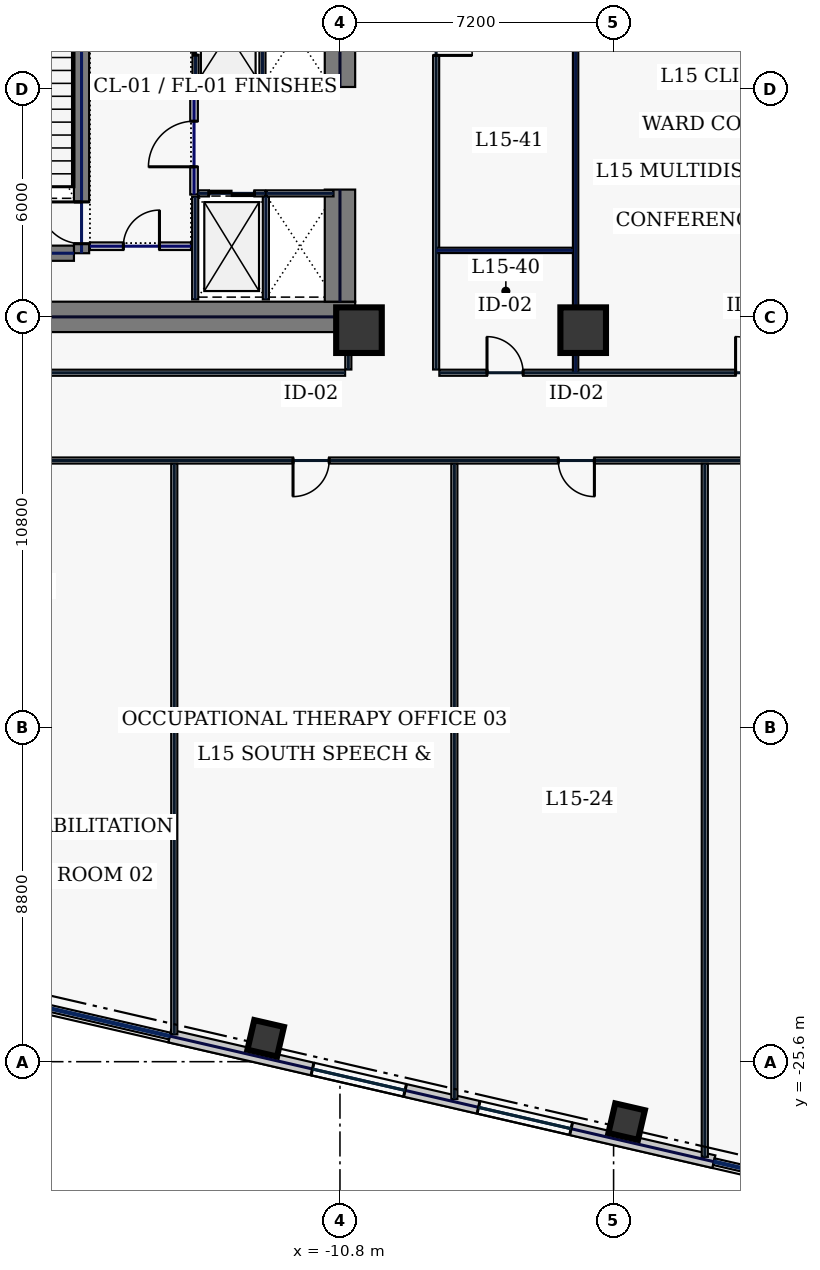
"""IFC4 building model, lengths in metres.
Left out: names, types, materials, properties, quantities, classifications, styles, units other than length and angle.
Written with IfcOpenShell. Run it as: python <this file> out.ifc"""

import sys

from ifc_helpers import new_model, si_unit, direction, frame, frame_2d, origin, origin_2d, place, context, subcontext, project, spatial, rectangle, hollow_rectangle, extrude, element, fill, save


model = new_model("IFC4")
c1 = context("Model", 3, precision=1e-05, world=origin(), true_north=direction((0.0, 1.0)))
c2 = subcontext(c1, "Body", "Model", "MODEL_VIEW")
j1 = project(units=[si_unit("LENGTHUNIT", "METRE"), si_unit("PLANEANGLEUNIT", "RADIAN")], contexts=[c1])
p1 = place(None, origin())
s1 = spatial("IfcSite", under=j1, at=p1, CompositionType="ELEMENT")
p2 = place(p1, origin())
s2 = spatial("IfcBuilding", under=s1, at=p2, CompositionType="ELEMENT")
p3 = place(p2, frame((0.0, 0.0, 71.4)))
s3 = spatial("IfcBuildingStorey", under=s2, at=p3, CompositionType="ELEMENT", Elevation=71.4)
p4 = place(p3, frame((-22.0, -6.0, 0.0), z_axis=(0.0, 0.0, 1.0), x_axis=(1.0, 0.0, 0.0)))
e1 = element("IfcWall", 1, at=p4, inside=s3, PredefinedType="SHEAR", context=c2, shape_type="SweptSolid", body=[
    extrude(rectangle(XDim=11.6, YDim=0.8, at=frame_2d((5.8, 0.0))), origin(), (0.0, 0.0, 1.0), 3.74),
])
p5 = place(p3, frame((-10.8, -5.6, 0.0), z_axis=(0.0, 0.0, 1.0), x_axis=(0.0, 1.0, 0.0)))
e2 = element("IfcWall", 2, at=p5, inside=s3, PredefinedType="SHEAR", context=c2, shape_type="SweptSolid", body=[
    extrude(rectangle(XDim=2.95, YDim=0.8, at=frame_2d((1.475, 0.0))), origin(), (0.0, 0.0, 1.0), 3.74),
])
p6 = place(p3, frame((-10.8, 0.05, 0.0), z_axis=(0.0, 0.0, 1.0), x_axis=(0.0, 1.0, 0.0)))
e3 = element("IfcWall", 3, at=p6, inside=s3, PredefinedType="SHEAR", context=c2, shape_type="SweptSolid", body=[
    extrude(rectangle(XDim=5.55, YDim=0.8, at=frame_2d((2.775, 0.0))), origin(), (0.0, 0.0, 1.0), 3.74),
])
p7 = place(p3, frame((-17.6, -4.325, 0.0), z_axis=(0.0, 0.0, 1.0), x_axis=(0.0, 1.0, 0.0)))
e4 = element("IfcWall", 4, at=p7, inside=s3, PredefinedType="SHEAR", context=c2, shape_type="SweptSolid", body=[
    extrude(rectangle(XDim=8.65, YDim=0.4, at=frame_2d((4.325, 0.0))), origin(), (0.0, 0.0, 1.0), 3.74),
])
p8 = place(p7, frame((0.25, 0.0, 0.0)))
e5 = element("IfcOpeningElement", 5, at=p8, cuts=e4, PredefinedType="OPENING", context=c2, shape_type="SweptSolid", body=[
    extrude(rectangle(XDim=1.1, YDim=2.2, at=frame_2d((0.55, 1.1))), frame((0.0, 0.21, 0.0), z_axis=(0.0, -1.0, 0.0), x_axis=(1.0, 0.0, 0.0)), (0.0, 0.0, 1.0), 0.42),
])
p9 = place(p3, frame((-21.2, -4.325, 0.0), z_axis=(0.0, 0.0, 1.0), x_axis=(1.0, 0.0, 0.0)))
e6 = element("IfcWall", 6, at=p9, inside=s3, PredefinedType="SHEAR", context=c2, shape_type="SweptSolid", body=[
    extrude(rectangle(XDim=3.4, YDim=0.4, at=frame_2d((1.7, 0.0))), origin(), (0.0, 0.0, 1.0), 3.74),
])
for number, where, z_axis, x_axis in (
    (7, (-10.3, -6.35, 0.0), (0.0, 0.0, 1.0), (1.0, 0.0, 0.0)),
    (8, (-4.4, -6.35, 0.0), (0.0, 0.0, 1.0), (1.0, 0.0, 0.0)),
):
    element("IfcColumn", number, at=place(p3, frame(where, z_axis=z_axis, x_axis=x_axis)), inside=s3, PredefinedType="COLUMN", context=c2, shape_type="SweptSolid", body=[
        extrude(hollow_rectangle(XDim=1.2, YDim=1.2, WallThickness=0.05, at=origin_2d()), origin(), (0.0, 0.0, 1.0), 3.74),
    ])
for number, where, z_axis, x_axis in (
    (9, (-12.755, -24.985, 0.0), (0.0, 0.0, 1.0), (0.974, -0.225, 0.0)),
    (10, (-3.256, -27.178, 0.0), (0.0, 0.0, 1.0), (0.974, -0.225, 0.0)),
):
    element("IfcColumn", number, at=place(p3, frame(where, z_axis=z_axis, x_axis=x_axis)), inside=s3, PredefinedType="COLUMN", context=c2, shape_type="SweptSolid", body=[
        extrude(hollow_rectangle(XDim=0.8, YDim=0.8, WallThickness=0.036, at=origin_2d()), origin(), (0.0, 0.0, 1.0), 3.74),
    ])
p10 = place(p3, frame((-15.281, -24.925, 0.0), z_axis=(0.0, 0.0, 1.0), x_axis=(0.974370193991, -0.22495049469, 0.0)))
e11 = element("IfcWall", 11, at=p10, inside=s3, PredefinedType="STANDARD", context=c2, shape_type="SweptSolid", body=[
    extrude(rectangle(XDim=14.697, YDim=0.34, at=frame_2d((7.349, 0.0))), origin(), (0.0, 0.0, 1.0), 3.74),
])
p11 = place(p10, frame((3.856, 0.0, 0.72)))
e12 = element("IfcOpeningElement", 12, at=p11, cuts=e11, PredefinedType="OPENING", context=c2, shape_type="SweptSolid", body=[
    extrude(rectangle(XDim=2.5, YDim=2.15, at=frame_2d((1.25, 1.075))), frame((0.0, 0.18, 0.0), z_axis=(0.0, -1.0, 0.0), x_axis=(1.0, 0.0, 0.0)), (0.0, 0.0, 1.0), 0.36),
])
p12 = place(p10, frame((8.341, 0.0, 0.72)))
e13 = element("IfcOpeningElement", 13, at=p12, cuts=e11, PredefinedType="OPENING", context=c2, shape_type="SweptSolid", body=[
    extrude(rectangle(XDim=2.5, YDim=2.15, at=frame_2d((1.25, 1.075))), frame((0.0, 0.18, 0.0), z_axis=(0.0, -1.0, 0.0), x_axis=(1.0, 0.0, 0.0)), (0.0, 0.0, 1.0), 0.36),
])
p13 = place(p3, frame((-14.6, 0.12, 0.0), z_axis=(0.0, 0.0, 1.0), x_axis=(0.0, 1.0, 0.0)))
e14 = element("IfcWall", 14, at=p13, inside=s3, PredefinedType="PARTITIONING", context=c2, shape_type="SweptSolid", body=[
    extrude(rectangle(XDim=2.74, YDim=0.16, at=frame_2d((1.37, 0.0))), origin(), (0.0, 0.0, 1.0), 3.74),
])
p14 = place(p13, frame((0.77, 0.0, 0.0)))
e15 = element("IfcOpeningElement", 15, at=p14, cuts=e14, PredefinedType="OPENING", context=c2, shape_type="SweptSolid", body=[
    extrude(rectangle(XDim=1.2, YDim=2.2, at=frame_2d((0.6, 1.1))), frame((0.0, 0.09, 0.0), z_axis=(0.0, -1.0, 0.0), x_axis=(1.0, 0.0, 0.0)), (0.0, 0.0, 1.0), 0.18),
])
p15 = place(p3, frame((-14.6, 0.1, 0.0), z_axis=(0.0, 0.0, 1.0), x_axis=(1.0, 0.0, 0.0)))
e16 = element("IfcWall", 16, at=p15, inside=s3, PredefinedType="PARTITIONING", context=c2, shape_type="SweptSolid", body=[
    extrude(rectangle(XDim=1.76, YDim=0.16, at=frame_2d((0.88, 0.0))), origin(), (0.0, 0.0, 1.0), 3.74),
])
p16 = place(p3, frame((-12.84, 0.18, 0.0), z_axis=(0.0, 0.0, 1.0), x_axis=(0.0, 1.0, 0.0)))
e17 = element("IfcWall", 17, at=p16, inside=s3, PredefinedType="PARTITIONING", context=c2, shape_type="SweptSolid", body=[
    extrude(rectangle(XDim=2.62, YDim=0.16, at=frame_2d((1.31, 0.0))), origin(), (0.0, 0.0, 1.0), 3.74),
])
p17 = place(p3, frame((-14.53, -2.75, 0.0), z_axis=(0.0, 0.0, 1.0), x_axis=(1.0, 0.0, 0.0)))
e18 = element("IfcWall", 18, at=p17, inside=s3, PredefinedType="PARTITIONING", context=c2, shape_type="SweptSolid", body=[
    extrude(rectangle(XDim=1.76, YDim=0.16, at=frame_2d((0.88, 0.0))), origin(), (0.0, 0.0, 1.0), 3.74),
])
p18 = place(p17, frame((0.28, 0.0, 0.0)))
e19 = element("IfcOpeningElement", 19, at=p18, cuts=e18, PredefinedType="OPENING", context=c2, shape_type="SweptSolid", body=[
    extrude(rectangle(XDim=1.2, YDim=2.2, at=frame_2d((0.6, 1.1))), frame((0.0, 0.09, 0.0), z_axis=(0.0, -1.0, 0.0), x_axis=(1.0, 0.0, 0.0)), (0.0, 0.0, 1.0), 0.18),
])
for number, where, z_axis, x_axis in (
    (20, (-12.75, -5.54, 0.0), (0.0, 0.0, 1.0), (0.0, 1.0, 0.0)),
    (21, (-14.61, -5.54, 0.0), (0.0, 0.0, 1.0), (0.0, 1.0, 0.0)),
):
    element("IfcWall", number, at=place(p3, frame(where, z_axis=z_axis, x_axis=x_axis)), inside=s3, PredefinedType="PARTITIONING", context=c2, shape_type="SweptSolid", body=[
        extrude(rectangle(XDim=2.7, YDim=0.16, at=frame_2d((1.35, 0.0))), origin(), (0.0, 0.0, 1.0), 3.74),
    ])
p19 = place(p3, frame((-12.73, -2.75, 0.0), z_axis=(0.0, 0.0, 1.0), x_axis=(1.0, 0.0, 0.0)))
e22 = element("IfcWall", 22, at=p19, inside=s3, PredefinedType="PARTITIONING", context=c2, shape_type="SweptSolid", body=[
    extrude(rectangle(XDim=1.76, YDim=0.16, at=frame_2d((0.88, 0.0))), origin(), (0.0, 0.0, 1.0), 3.74),
])
p20 = place(p3, frame((-12.82, 0.06, 0.0), z_axis=(0.0, 0.0, 1.0), x_axis=(1.0, 0.0, 0.0)))
e23 = element("IfcWall", 23, at=p20, inside=s3, PredefinedType="PARTITIONING", context=c2, shape_type="SweptSolid", body=[
    extrude(rectangle(XDim=1.72, YDim=0.16, at=frame_2d((0.86, 0.0))), origin(), (0.0, 0.0, 1.0), 3.74),
])
p21 = place(p3, frame((-17.38, -4.14, 0.0), z_axis=(0.0, 0.0, 1.0), x_axis=(1.0, 0.0, 0.0)))
e24 = element("IfcWall", 24, at=p21, inside=s3, PredefinedType="SOLIDWALL", context=c2, shape_type="SweptSolid", body=[
    extrude(rectangle(XDim=2.66, YDim=0.2, at=frame_2d((1.33, 0.0))), origin(), (0.0, 0.0, 1.0), 3.74),
])
p22 = place(p21, frame((0.88, 0.0, 0.0)))
e25 = element("IfcOpeningElement", 25, at=p22, cuts=e24, PredefinedType="OPENING", context=c2, shape_type="SweptSolid", body=[
    extrude(rectangle(XDim=0.95, YDim=2.2, at=frame_2d((0.475, 1.1))), frame((0.0, 0.11, 0.0), z_axis=(0.0, -1.0, 0.0), x_axis=(1.0, 0.0, 0.0)), (0.0, 0.0, 1.0), 0.22),
])
p23 = place(p3, frame((-14.64, -2.78, 0.0), z_axis=(0.0, 0.0, 1.0), x_axis=(0.0, 1.0, 0.0)))
e26 = element("IfcWall", 26, at=p23, inside=s3, PredefinedType="SOLIDWALL", context=c2, shape_type="SweptSolid", body=[
    extrude(rectangle(XDim=2.82, YDim=0.2, at=frame_2d((1.41, 0.0))), origin(), (0.0, 0.0, 1.0), 3.74),
])
p24 = place(p23, frame((0.73, 0.0, 0.0)))
e27 = element("IfcOpeningElement", 27, at=p24, cuts=e26, PredefinedType="OPENING", context=c2, shape_type="SweptSolid", body=[
    extrude(rectangle(XDim=1.2, YDim=2.2, at=frame_2d((0.6, 1.1))), frame((0.0, 0.11, 0.0), z_axis=(0.0, -1.0, 0.0), x_axis=(1.0, 0.0, 0.0)), (0.0, 0.0, 1.0), 0.22),
])
p25 = place(p3, frame((29.415, -9.78, 0.0), z_axis=(0.0, 0.0, 1.0), x_axis=(-1.0, 0.0, 0.0)))
e28 = element("IfcWall", 28, at=p25, inside=s3, PredefinedType="PARTITIONING", context=c2, shape_type="SweptSolid", body=[
    extrude(rectangle(XDim=50.65, YDim=0.16, at=frame_2d((25.325, 0.0))), origin(), (0.0, 0.0, 1.0), 3.74),
])
p26 = place(p25, frame((40.5, 0.0, 0.0)))
e29 = element("IfcOpeningElement", 29, at=p26, cuts=e28, PredefinedType="OPENING", context=c2, shape_type="SweptSolid", body=[
    extrude(rectangle(XDim=0.95, YDim=2.2, at=frame_2d((0.475, 1.1))), frame((0.0, 0.09, 0.0), z_axis=(0.0, -1.0, 0.0), x_axis=(1.0, 0.0, 0.0)), (0.0, 0.0, 1.0), 0.18),
])
p27 = place(p25, frame((33.52, 0.0, 0.0)))
e30 = element("IfcOpeningElement", 30, at=p27, cuts=e28, PredefinedType="OPENING", context=c2, shape_type="SweptSolid", body=[
    extrude(rectangle(XDim=0.95, YDim=2.2, at=frame_2d((0.475, 1.1))), frame((0.0, 0.09, 0.0), z_axis=(0.0, -1.0, 0.0), x_axis=(1.0, 0.0, 0.0)), (0.0, 0.0, 1.0), 0.18),
])
p28 = place(p25, frame((26.525, 0.0, 0.0)))
e31 = element("IfcOpeningElement", 31, at=p28, cuts=e28, PredefinedType="OPENING", context=c2, shape_type="SweptSolid", body=[
    extrude(rectangle(XDim=0.95, YDim=2.2, at=frame_2d((0.475, 1.1))), frame((0.0, 0.09, 0.0), z_axis=(0.0, -1.0, 0.0), x_axis=(1.0, 0.0, 0.0)), (0.0, 0.0, 1.0), 0.18),
])
p29 = place(p25, frame((20.75, 0.0, 0.0)))
e32 = element("IfcOpeningElement", 32, at=p29, cuts=e28, PredefinedType="OPENING", context=c2, shape_type="SweptSolid", body=[
    extrude(rectangle(XDim=1.05, YDim=2.2, at=frame_2d((0.525, 1.1))), frame((0.0, 0.09, 0.0), z_axis=(0.0, -1.0, 0.0), x_axis=(1.0, 0.0, 0.0)), (0.0, 0.0, 1.0), 0.18),
])
p30 = place(p25, frame((17.05, 0.0, 0.0)))
e33 = element("IfcOpeningElement", 33, at=p30, cuts=e28, PredefinedType="OPENING", context=c2, shape_type="SweptSolid", body=[
    extrude(rectangle(XDim=0.95, YDim=2.2, at=frame_2d((0.475, 1.1))), frame((0.0, 0.09, 0.0), z_axis=(0.0, -1.0, 0.0), x_axis=(1.0, 0.0, 0.0)), (0.0, 0.0, 1.0), 0.18),
])
p31 = place(p25, frame((13.35, 0.0, 0.0)))
e34 = element("IfcOpeningElement", 34, at=p31, cuts=e28, PredefinedType="OPENING", context=c2, shape_type="SweptSolid", body=[
    extrude(rectangle(XDim=1.15, YDim=2.2, at=frame_2d((0.575, 1.1))), frame((0.0, 0.09, 0.0), z_axis=(0.0, -1.0, 0.0), x_axis=(1.0, 0.0, 0.0)), (0.0, 0.0, 1.0), 0.18),
])
p32 = place(p25, frame((9.65, 0.0, 0.0)))
e35 = element("IfcOpeningElement", 35, at=p32, cuts=e28, PredefinedType="OPENING", context=c2, shape_type="SweptSolid", body=[
    extrude(rectangle(XDim=0.95, YDim=2.2, at=frame_2d((0.475, 1.1))), frame((0.0, 0.09, 0.0), z_axis=(0.0, -1.0, 0.0), x_axis=(1.0, 0.0, 0.0)), (0.0, 0.0, 1.0), 0.18),
])
p33 = place(p25, frame((6.1, 0.0, 0.0)))
e36 = element("IfcOpeningElement", 36, at=p33, cuts=e28, PredefinedType="OPENING", context=c2, shape_type="SweptSolid", body=[
    extrude(rectangle(XDim=0.95, YDim=2.2, at=frame_2d((0.475, 1.1))), frame((0.0, 0.09, 0.0), z_axis=(0.0, -1.0, 0.0), x_axis=(1.0, 0.0, 0.0)), (0.0, 0.0, 1.0), 0.18),
])
p34 = place(p25, frame((2.044, 0.0, 0.0)))
e37 = element("IfcOpeningElement", 37, at=p34, cuts=e28, PredefinedType="OPENING", context=c2, shape_type="SweptSolid", body=[
    extrude(rectangle(XDim=1.05, YDim=2.2, at=frame_2d((0.525, 1.1))), frame((0.0, 0.09, 0.0), z_axis=(0.0, -1.0, 0.0), x_axis=(1.0, 0.0, 0.0)), (0.0, 0.0, 1.0), 0.18),
])
p35 = place(p3, frame((-8.27, 7.435, 0.0), z_axis=(0.0, 0.0, 1.0), x_axis=(0.0, -1.0, 0.0)))
e38 = element("IfcWall", 38, at=p35, inside=s3, PredefinedType="PARTITIONING", context=c2, shape_type="SweptSolid", body=[
    extrude(rectangle(XDim=14.82, YDim=0.16, at=frame_2d((7.41, 0.0))), origin(), (0.0, 0.0, 1.0), 3.74),
])
p36 = place(p35, frame((5.604, 0.0, 0.0)))
e39 = element("IfcOpeningElement", 39, at=p36, cuts=e38, PredefinedType="OPENING", context=c2, shape_type="SweptSolid", body=[
    extrude(rectangle(XDim=0.95, YDim=2.2, at=frame_2d((0.475, 1.1))), frame((0.0, 0.09, 0.0), z_axis=(0.0, -1.0, 0.0), x_axis=(1.0, 0.0, 0.0)), (0.0, 0.0, 1.0), 0.18),
])
p37 = place(p3, frame((-8.185, -7.47, 0.0), z_axis=(0.0, 0.0, 1.0), x_axis=(1.0, 0.0, 0.0)))
e40 = element("IfcWall", 40, at=p37, inside=s3, PredefinedType="PARTITIONING", context=c2, shape_type="SweptSolid", body=[
    extrude(rectangle(XDim=16.37, YDim=0.16, at=frame_2d((8.185, 0.0))), origin(), (0.0, 0.0, 1.0), 3.74),
])
p38 = place(p37, frame((1.254, 0.0, 0.0)))
e41 = element("IfcOpeningElement", 41, at=p38, cuts=e40, PredefinedType="OPENING", context=c2, shape_type="SweptSolid", body=[
    extrude(rectangle(XDim=0.95, YDim=2.2, at=frame_2d((0.475, 1.1))), frame((0.0, 0.09, 0.0), z_axis=(0.0, -1.0, 0.0), x_axis=(1.0, 0.0, 0.0)), (0.0, 0.0, 1.0), 0.18),
])
p39 = place(p37, frame((7.795, 0.0, 0.0)))
e42 = element("IfcOpeningElement", 42, at=p39, cuts=e40, PredefinedType="OPENING", context=c2, shape_type="SweptSolid", body=[
    extrude(rectangle(XDim=0.95, YDim=2.2, at=frame_2d((0.475, 1.1))), frame((0.0, 0.09, 0.0), z_axis=(0.0, -1.0, 0.0), x_axis=(1.0, 0.0, 0.0)), (0.0, 0.0, 1.0), 0.18),
])
p40 = place(p3, frame((-10.58, -7.385, 0.0), z_axis=(0.0, 0.0, 1.0), x_axis=(0.0, 1.0, 0.0)))
e43 = element("IfcWall", 43, at=p40, inside=s3, PredefinedType="PARTITIONING", context=c2, shape_type="SweptSolid", body=[
    extrude(rectangle(XDim=0.965, YDim=0.16, at=frame_2d((0.482, 0.0))), origin(), (0.0, 0.0, 1.0), 3.74),
])
p41 = place(p3, frame((-27.185, -7.47, 0.0), z_axis=(0.0, 0.0, 1.0), x_axis=(1.0, 0.0, 0.0)))
e44 = element("IfcWall", 44, at=p41, inside=s3, PredefinedType="PARTITIONING", context=c2, shape_type="SweptSolid", body=[
    extrude(rectangle(XDim=16.52, YDim=0.16, at=frame_2d((8.26, 0.0))), origin(), (0.0, 0.0, 1.0), 3.74),
])
p42 = place(p3, frame((-15.16, -24.881, 0.0), z_axis=(0.0, 0.0, 1.0), x_axis=(0.0, 1.0, 0.0)))
e45 = element("IfcWall", 45, at=p42, inside=s3, PredefinedType="PARTITIONING", context=c2, shape_type="SweptSolid", body=[
    extrude(rectangle(XDim=15.016, YDim=0.16, at=frame_2d((7.508, 0.0))), origin(), (0.0, 0.0, 1.0), 3.74),
])
p43 = place(p3, frame((-7.79, -26.583, 0.0), z_axis=(0.0, 0.0, 1.0), x_axis=(0.0, 1.0, 0.0)))
e46 = element("IfcWall", 46, at=p43, inside=s3, PredefinedType="PARTITIONING", context=c2, shape_type="SweptSolid", body=[
    extrude(rectangle(XDim=16.718, YDim=0.16, at=frame_2d((8.359, 0.0))), origin(), (0.0, 0.0, 1.0), 3.74),
])
p44 = place(p3, frame((-1.2, -28.104, 0.0), z_axis=(0.0, 0.0, 1.0), x_axis=(0.0, 1.0, 0.0)))
e47 = element("IfcWall", 47, at=p44, inside=s3, PredefinedType="PARTITIONING", context=c2, shape_type="SweptSolid", body=[
    extrude(rectangle(XDim=18.239, YDim=0.16, at=frame_2d((9.12, 0.0))), origin(), (0.0, 0.0, 1.0), 3.74),
])
p45 = place(p3, frame((-4.6, -7.465, 0.0), z_axis=(0.0, 0.0, 1.0), x_axis=(0.0, 1.0, 0.0)))
e48 = element("IfcWall", 48, at=p45, inside=s3, PredefinedType="PARTITIONING", context=c2, shape_type="SweptSolid", body=[
    extrude(rectangle(XDim=14.98, YDim=0.14, at=frame_2d((7.49, 0.0))), origin(), (0.0, 0.0, 1.0), 2.935),
])
p46 = place(p3, frame((-8.265, -4.25, 0.0), z_axis=(0.0, 0.0, 1.0), x_axis=(1.0, 0.0, 0.0)))
e49 = element("IfcWall", 49, at=p46, inside=s3, PredefinedType="PARTITIONING", context=c2, shape_type="SweptSolid", body=[
    extrude(rectangle(XDim=3.59, YDim=0.14, at=frame_2d((1.795, 0.0))), origin(), (0.0, 0.0, 1.0), 3.74),
])
p47 = place(p11, origin())
e50 = element("IfcWindow", 50, at=p47, inside=s3, PartitioningType="SINGLE_PANEL", PredefinedType="WINDOW", context=c2, shape_type="SweptSolid", body=[
    extrude(rectangle(XDim=2.5, YDim=2.15, at=frame_2d((1.25, 1.075))), frame((0.0, 0.03, 0.0), z_axis=(0.0, -1.0, 0.0), x_axis=(1.0, 0.0, 0.0)), (0.0, 0.0, 1.0), 0.06),
])
fill(e12, e50)
p48 = place(p12, origin())
e51 = element("IfcWindow", 51, at=p48, inside=s3, PartitioningType="SINGLE_PANEL", PredefinedType="WINDOW", context=c2, shape_type="SweptSolid", body=[
    extrude(rectangle(XDim=2.5, YDim=2.15, at=frame_2d((1.25, 1.075))), frame((0.0, 0.03, 0.0), z_axis=(0.0, -1.0, 0.0), x_axis=(1.0, 0.0, 0.0)), (0.0, 0.0, 1.0), 0.06),
])
fill(e13, e51)
p49 = place(p8, origin())
e52 = element("IfcDoor", 52, at=p49, inside=s3, OperationType="SINGLE_SWING_RIGHT", PredefinedType="DOOR", context=c2, shape_type="SweptSolid", body=[
    extrude(rectangle(XDim=1.1, YDim=2.2, at=frame_2d((0.55, 1.1))), frame((0.0, 0.025, 0.0), z_axis=(0.0, -1.0, 0.0), x_axis=(1.0, 0.0, 0.0)), (0.0, 0.0, 1.0), 0.05),
])
fill(e5, e52)
p50 = place(p14, origin())
e53 = element("IfcDoor", 53, at=p50, inside=s3, OperationType="SLIDING_TO_LEFT", PredefinedType="DOOR", context=c2, shape_type="SweptSolid", body=[
    extrude(rectangle(XDim=1.2, YDim=2.2, at=frame_2d((0.6, 1.1))), frame((0.0, 0.025, 0.0), z_axis=(0.0, -1.0, 0.0), x_axis=(1.0, 0.0, 0.0)), (0.0, 0.0, 1.0), 0.05),
])
fill(e15, e53)
p51 = place(p18, origin())
e54 = element("IfcDoor", 54, at=p51, inside=s3, OperationType="SLIDING_TO_LEFT", PredefinedType="DOOR", context=c2, shape_type="SweptSolid", body=[
    extrude(rectangle(XDim=1.2, YDim=2.2, at=frame_2d((0.6, 1.1))), frame((0.0, 0.025, 0.0), z_axis=(0.0, -1.0, 0.0), x_axis=(1.0, 0.0, 0.0)), (0.0, 0.0, 1.0), 0.05),
])
fill(e19, e54)
p52 = place(p22, origin())
e55 = element("IfcDoor", 55, at=p52, inside=s3, OperationType="SINGLE_SWING_RIGHT", PredefinedType="DOOR", context=c2, shape_type="SweptSolid", body=[
    extrude(rectangle(XDim=0.95, YDim=2.2, at=frame_2d((0.475, 1.1))), frame((0.0, 0.025, 0.0), z_axis=(0.0, -1.0, 0.0), x_axis=(1.0, 0.0, 0.0)), (0.0, 0.0, 1.0), 0.05),
])
fill(e25, e55)
p53 = place(p24, origin())
e56 = element("IfcDoor", 56, at=p53, inside=s3, OperationType="SINGLE_SWING_LEFT", PredefinedType="DOOR", context=c2, shape_type="SweptSolid", body=[
    extrude(rectangle(XDim=1.2, YDim=2.2, at=frame_2d((0.6, 1.1))), frame((0.0, 0.025, 0.0), z_axis=(0.0, -1.0, 0.0), x_axis=(1.0, 0.0, 0.0)), (0.0, 0.0, 1.0), 0.05),
])
fill(e27, e56)
p54 = place(p26, origin())
e57 = element("IfcDoor", 57, at=p54, inside=s3, OperationType="SINGLE_SWING_RIGHT", PredefinedType="DOOR", context=c2, shape_type="SweptSolid", body=[
    extrude(rectangle(XDim=0.95, YDim=2.2, at=frame_2d((0.475, 1.1))), frame((0.0, 0.025, 0.0), z_axis=(0.0, -1.0, 0.0), x_axis=(1.0, 0.0, 0.0)), (0.0, 0.0, 1.0), 0.05),
])
fill(e29, e57)
p55 = place(p27, origin())
e58 = element("IfcDoor", 58, at=p55, inside=s3, OperationType="SINGLE_SWING_LEFT", PredefinedType="DOOR", context=c2, shape_type="SweptSolid", body=[
    extrude(rectangle(XDim=0.95, YDim=2.2, at=frame_2d((0.475, 1.1))), frame((0.0, 0.025, 0.0), z_axis=(0.0, -1.0, 0.0), x_axis=(1.0, 0.0, 0.0)), (0.0, 0.0, 1.0), 0.05),
])
fill(e30, e58)
p56 = place(p38, origin())
e59 = element("IfcDoor", 59, at=p56, inside=s3, OperationType="SINGLE_SWING_LEFT", PredefinedType="DOOR", context=c2, shape_type="SweptSolid", body=[
    extrude(rectangle(XDim=0.95, YDim=2.2, at=frame_2d((0.475, 1.1))), frame((0.0, 0.025, 0.0), z_axis=(0.0, -1.0, 0.0), x_axis=(1.0, 0.0, 0.0)), (0.0, 0.0, 1.0), 0.05),
])
fill(e41, e59)
p57 = place(p36, origin())
e60 = element("IfcDoor", 60, at=p57, inside=s3, OperationType="SINGLE_SWING_RIGHT", PredefinedType="DOOR", context=c2, shape_type="SweptSolid", body=[
    extrude(rectangle(XDim=0.95, YDim=2.2, at=frame_2d((0.475, 1.1))), frame((0.0, 0.025, 0.0), z_axis=(0.0, -1.0, 0.0), x_axis=(1.0, 0.0, 0.0)), (0.0, 0.0, 1.0), 0.05),
])
fill(e39, e60)
p58 = place(p39, origin())
e61 = element("IfcDoor", 61, at=p58, inside=s3, OperationType="SINGLE_SWING_LEFT", PredefinedType="DOOR", context=c2, shape_type="SweptSolid", body=[
    extrude(rectangle(XDim=0.95, YDim=2.2, at=frame_2d((0.475, 1.1))), frame((0.0, 0.025, 0.0), z_axis=(0.0, -1.0, 0.0), x_axis=(1.0, 0.0, 0.0)), (0.0, 0.0, 1.0), 0.05),
])
fill(e42, e61)
save(model, sys.argv[1])
